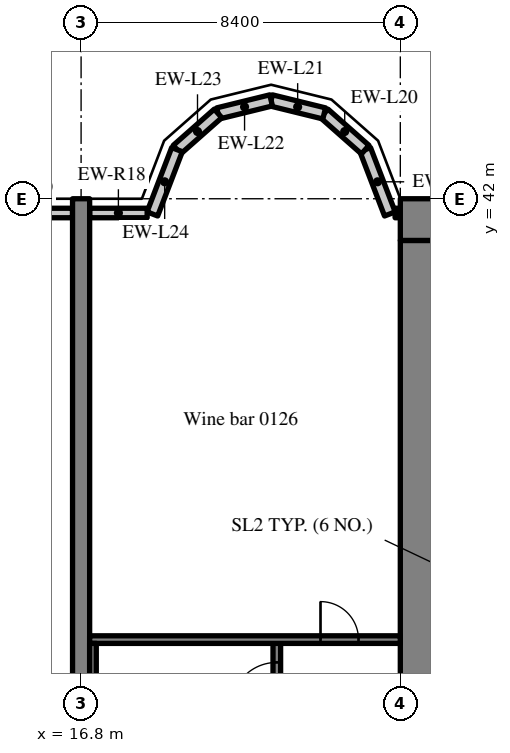
"""IFC4 building model, lengths in metres.
Left out: names, types, materials, properties, quantities, classifications, styles, units other than length and angle.
Written with IfcOpenShell. Run it as: python <this file> out.ifc"""

import sys

from ifc_helpers import new_model, si_unit, direction, frame, frame_2d, origin, place, context, subcontext, project, spatial, rectangle, extrude, source, transform, mapped, element, fill, save


model = new_model("IFC4")
c1 = context("Model", 3, precision=1e-05, world=origin(), true_north=direction((0.0, 1.0)))
c2 = subcontext(c1, "Body", "Model", "MODEL_VIEW")
j1 = project(units=[si_unit("LENGTHUNIT", "METRE"), si_unit("PLANEANGLEUNIT", "RADIAN")], contexts=[c1])
p1 = place(None, origin())
s1 = spatial("IfcSite", under=j1, at=p1, CompositionType="ELEMENT")
p2 = place(p1, origin())
s2 = spatial("IfcBuilding", under=s1, at=p2, CompositionType="ELEMENT")
p3 = place(p2, frame((0.0, 0.0, 6.0)))
s3 = spatial("IfcBuildingStorey", under=s2, at=p3, CompositionType="ELEMENT", Elevation=6.0)
m1 = source(origin(), c2, "Body", "SweptSolid", [
    extrude(rectangle(XDim=50.4, YDim=1.1, at=frame_2d((25.2, 0.0))), origin(), (0.0, 0.0, 1.0), 5.12),
])
p4 = place(p3, frame((25.2, 41.45, 0.0), z_axis=(0.0, 0.0, 1.0), x_axis=(1.0, 0.0, 0.0)))
e1 = element("IfcWall", 1, at=p4, inside=s3, PredefinedType="SHEAR", context=c2, shape_type="MappedRepresentation", body=[
    mapped(m1, transform((0.0, 0.0, 0.0), scale=1.0)),
])
m2 = source(origin(), c2, "Body", "SweptSolid", [
    extrude(rectangle(XDim=17.8, YDim=1.1, at=frame_2d((8.9, 0.0))), origin(), (0.0, 0.0, 1.0), 5.12),
])
p5 = place(p3, frame((25.75, 23.1, 0.0), z_axis=(0.0, 0.0, 1.0), x_axis=(0.0, 1.0, 0.0)))
e2 = element("IfcWall", 2, at=p5, inside=s3, PredefinedType="SHEAR", context=c2, shape_type="MappedRepresentation", body=[
    mapped(m2, transform((0.0, 0.0, 0.0), scale=1.0)),
])
m3 = source(origin(), c2, "Body", "SweptSolid", [
    extrude(rectangle(XDim=20.0, YDim=0.45, at=frame_2d((10.0, 0.0))), origin(), (0.0, 0.0, 1.0), 5.12),
])
p6 = place(p3, frame((16.8, 22.0, 0.0), z_axis=(0.0, 0.0, 1.0), x_axis=(0.0, 1.0, 0.0)))
e3 = element("IfcWall", 3, at=p6, inside=s3, PredefinedType="SHEAR", context=c2, shape_type="MappedRepresentation", body=[
    mapped(m3, transform((0.0, 0.0, 0.0), scale=1.0)),
])
m4 = source(origin(), c2, "Body", "SweptSolid", [
    extrude(rectangle(XDim=0.138, YDim=0.25, at=frame_2d((0.069, 0.0))), origin(), (0.0, 0.0, 1.0), 4.37),
])
p7 = place(p3, frame((25.2, 41.625, 0.0), z_axis=(0.0, 0.0, 1.0), x_axis=(-1.0, 0.0, 0.0)))
e4 = element("IfcWall", 4, at=p7, inside=s3, PredefinedType="SOLIDWALL", context=c2, shape_type="MappedRepresentation", body=[
    mapped(m4, transform((0.0, 0.0, 0.0), scale=1.0)),
])
m5 = source(origin(), c2, "Body", "SweptSolid", [
    extrude(rectangle(XDim=1.812, YDim=0.3, at=frame_2d((0.906, 0.0))), origin(), (0.0, 0.0, 1.0), 5.12),
])
p8 = place(p3, frame((24.925, 41.6, 0.0), z_axis=(0.0, 0.0, 1.0), x_axis=(-0.357759776872, 0.933813654886, 0.0)))
e5 = element("IfcWall", 5, at=p8, inside=s3, PredefinedType="SOLIDWALL", context=c2, shape_type="MappedRepresentation", body=[
    mapped(m5, transform((0.0, 0.0, 0.0), scale=1.0)),
])
m6 = source(origin(), c2, "Body", "SweptSolid", [
    extrude(rectangle(XDim=1.44, YDim=0.3, at=frame_2d((0.72, 0.0))), origin(), (0.0, 0.0, 1.0), 5.12),
])
p9 = place(p3, frame((24.277, 43.292, 0.0), z_axis=(0.0, 0.0, 1.0), x_axis=(-0.749649827867, 0.661834673902, 0.0)))
e6 = element("IfcWall", 6, at=p9, inside=s3, PredefinedType="SOLIDWALL", context=c2, shape_type="MappedRepresentation", body=[
    mapped(m6, transform((0.0, 0.0, 0.0), scale=1.0)),
])
m7 = source(origin(), c2, "Body", "SweptSolid", [
    extrude(rectangle(XDim=1.438, YDim=0.3, at=frame_2d((0.719, 0.0))), origin(), (0.0, 0.0, 1.0), 5.12),
])
p10 = place(p3, frame((23.197, 44.245, 0.0), z_axis=(0.0, 0.0, 1.0), x_axis=(-0.971152283879, 0.238460146601, 0.0)))
e7 = element("IfcWall", 7, at=p10, inside=s3, PredefinedType="SOLIDWALL", context=c2, shape_type="MappedRepresentation", body=[
    mapped(m7, transform((0.0, 0.0, 0.0), scale=1.0)),
])
m8 = source(origin(), c2, "Body", "SweptSolid", [
    extrude(rectangle(XDim=1.439, YDim=0.3, at=frame_2d((0.719, 0.0))), origin(), (0.0, 0.0, 1.0), 5.12),
])
p11 = place(p3, frame((21.8, 44.588, 0.0), z_axis=(0.0, 0.0, 1.0), x_axis=(-0.971161932466, -0.238420848351, 0.0)))
e8 = element("IfcWall", 8, at=p11, inside=s3, PredefinedType="SOLIDWALL", context=c2, shape_type="MappedRepresentation", body=[
    mapped(m8, transform((0.0, 0.0, 0.0), scale=1.0)),
])
m9 = source(origin(), c2, "Body", "SweptSolid", [
    extrude(rectangle(XDim=1.44, YDim=0.3, at=frame_2d((0.72, 0.0))), origin(), (0.0, 0.0, 1.0), 5.12),
])
p12 = place(p3, frame((20.403, 44.245, 0.0), z_axis=(0.0, 0.0, 1.0), x_axis=(-0.74957555648, -0.661918790432, 0.0)))
e9 = element("IfcWall", 9, at=p12, inside=s3, PredefinedType="SOLIDWALL", context=c2, shape_type="MappedRepresentation", body=[
    mapped(m9, transform((0.0, 0.0, 0.0), scale=1.0)),
])
m10 = source(origin(), c2, "Body", "SweptSolid", [
    extrude(rectangle(XDim=1.812, YDim=0.3, at=frame_2d((0.906, 0.0))), origin(), (0.0, 0.0, 1.0), 5.12),
])
p13 = place(p3, frame((19.323, 43.292, 0.0), z_axis=(0.0, 0.0, 1.0), x_axis=(-0.357877270961, -0.93376863244, 0.0)))
e10 = element("IfcWall", 10, at=p13, inside=s3, PredefinedType="SOLIDWALL", context=c2, shape_type="MappedRepresentation", body=[
    mapped(m10, transform((0.0, 0.0, 0.0), scale=1.0)),
])
m11 = source(origin(), c2, "Body", "SweptSolid", [
    extrude(rectangle(XDim=1.513, YDim=0.25, at=frame_2d((0.756, 0.0))), origin(), (0.0, 0.0, 1.0), 4.37),
])
p14 = place(p3, frame((18.538, 41.625, 0.0), z_axis=(0.0, 0.0, 1.0), x_axis=(-1.0, 0.0, 0.0)))
e11 = element("IfcWall", 11, at=p14, inside=s3, PredefinedType="SOLIDWALL", context=c2, shape_type="MappedRepresentation", body=[
    mapped(m11, transform((0.0, 0.0, 0.0), scale=1.0)),
])
m12 = source(origin(), c2, "Body", "SweptSolid", [
    extrude(rectangle(XDim=3.525, YDim=0.25, at=frame_2d((1.762, 0.0))), origin(), (0.0, 0.0, 1.0), 4.37),
])
p15 = place(p3, frame((16.575, 41.625, 0.0), z_axis=(0.0, 0.0, 1.0), x_axis=(-1.0, 0.0, 0.0)))
e12 = element("IfcWall", 12, at=p15, inside=s3, PredefinedType="SOLIDWALL", context=c2, shape_type="MappedRepresentation", body=[
    mapped(m12, transform((0.0, 0.0, 0.0), scale=1.0)),
])
m13 = source(origin(), c2, "Body", "SweptSolid", [
    extrude(rectangle(XDim=1.5, YDim=1.5, at=frame_2d((0.75, 0.75))), frame((0.0, 0.135, 0.0), z_axis=(0.0, -1.0, 0.0), x_axis=(1.0, 0.0, 0.0)), (0.0, 0.0, 1.0), 0.27),
])
p16 = place(p15, frame((1.012, 0.0, 0.9)))
e13 = element("IfcOpeningElement", 13, at=p16, cuts=e12, PredefinedType="OPENING", context=c2, shape_type="MappedRepresentation", body=[
    mapped(m13, transform((0.0, 0.0, 0.0), scale=1.0)),
])
m14 = source(origin(), c2, "Body", "SweptSolid", [
    extrude(rectangle(XDim=8.3, YDim=0.2, at=frame_2d((4.15, 0.0))), origin(), (0.0, 0.0, 1.0), 5.12),
])
p17 = place(p3, frame((21.95, 22.1, 0.0), z_axis=(0.0, 0.0, 1.0), x_axis=(0.0, 1.0, 0.0)))
e14 = element("IfcWall", 14, at=p17, inside=s3, PredefinedType="SOLIDWALL", context=c2, shape_type="MappedRepresentation", body=[
    mapped(m14, transform((0.0, 0.0, 0.0), scale=1.0)),
])
m15 = source(origin(), c2, "Body", "SweptSolid", [
    extrude(rectangle(XDim=1.2, YDim=2.1, at=frame_2d((0.6, 1.05))), frame((0.0, 0.11, 0.0), z_axis=(0.0, -1.0, 0.0), x_axis=(1.0, 0.0, 0.0)), (0.0, 0.0, 1.0), 0.22),
])
p18 = place(p17, frame((6.5, 0.0, 0.0)))
e15 = element("IfcOpeningElement", 15, at=p18, cuts=e14, PredefinedType="OPENING", context=c2, shape_type="MappedRepresentation", body=[
    mapped(m15, transform((0.0, 0.0, 0.0), scale=1.0)),
])
m16 = source(origin(), c2, "Body", "SweptSolid", [
    extrude(rectangle(XDim=8.175, YDim=0.2, at=frame_2d((4.087, 0.0))), origin(), (0.0, 0.0, 1.0), 5.12),
])
p19 = place(p3, frame((17.025, 30.4, 0.0), z_axis=(0.0, 0.0, 1.0), x_axis=(1.0, 0.0, 0.0)))
e16 = element("IfcWall", 16, at=p19, inside=s3, PredefinedType="SOLIDWALL", context=c2, shape_type="MappedRepresentation", body=[
    mapped(m16, transform((0.0, 0.0, 0.0), scale=1.0)),
])
m17 = source(origin(), c2, "Body", "SweptSolid", [
    extrude(rectangle(XDim=1.0, YDim=2.1, at=frame_2d((0.5, 1.05))), frame((0.0, 0.11, 0.0), z_axis=(0.0, -1.0, 0.0), x_axis=(1.0, 0.0, 0.0)), (0.0, 0.0, 1.0), 0.22),
])
p20 = place(p19, frame((6.075, 0.0, 0.0)))
e17 = element("IfcOpeningElement", 17, at=p20, cuts=e16, PredefinedType="OPENING", context=c2, shape_type="MappedRepresentation", body=[
    mapped(m17, transform((0.0, 0.0, 0.0), scale=1.0)),
])
m18 = source(origin(), c2, "Body", "SweptSolid", [
    extrude(rectangle(XDim=8.1, YDim=0.175, at=frame_2d((4.05, 0.0))), origin(), (0.0, 0.0, 1.0), 5.12),
])
p21 = place(p3, frame((17.112, 22.2, 0.0), z_axis=(0.0, 0.0, 1.0), x_axis=(0.0, 1.0, 0.0)))
e18 = element("IfcWall", 18, at=p21, inside=s3, PredefinedType="SOLIDWALL", context=c2, shape_type="MappedRepresentation", body=[
    mapped(m18, transform((0.0, 0.0, 0.0), scale=1.0)),
])
m19 = source(origin(), c2, "Body", "SweptSolid", [
    extrude(rectangle(XDim=1.2, YDim=2.1, at=frame_2d((0.6, 1.05))), frame((0.0, 0.025, 0.0), z_axis=(0.0, -1.0, 0.0), x_axis=(1.0, 0.0, 0.0)), (0.0, 0.0, 1.0), 0.05),
])
p22 = place(p18, origin())
e19 = element("IfcDoor", 19, at=p22, inside=s3, OperationType="SINGLE_SWING_LEFT", PredefinedType="DOOR", context=c2, shape_type="MappedRepresentation", body=[
    mapped(m19, transform((0.0, 0.0, 0.0), scale=1.0)),
])
fill(e15, e19)
m20 = source(origin(), c2, "Body", "SweptSolid", [
    extrude(rectangle(XDim=1.0, YDim=2.1, at=frame_2d((0.5, 1.05))), frame((0.0, 0.025, 0.0), z_axis=(0.0, -1.0, 0.0), x_axis=(1.0, 0.0, 0.0)), (0.0, 0.0, 1.0), 0.05),
])
p23 = place(p20, origin())
e20 = element("IfcDoor", 20, at=p23, inside=s3, OperationType="SINGLE_SWING_LEFT", PredefinedType="DOOR", context=c2, shape_type="MappedRepresentation", body=[
    mapped(m20, transform((0.0, 0.0, 0.0), scale=1.0)),
])
fill(e17, e20)
save(model, sys.argv[1])
